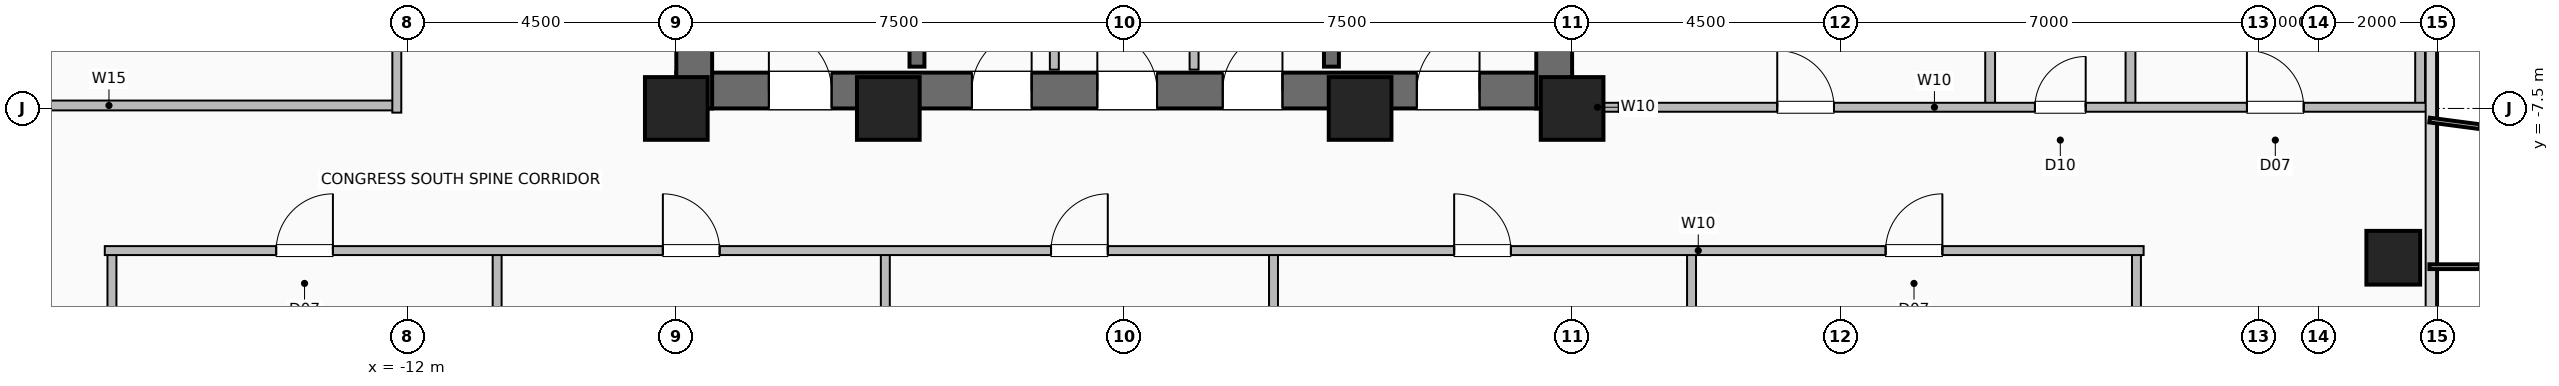
"""IFC4 building model, lengths in metres.
Left out: names, types, materials, properties, quantities, classifications, styles, units other than length and angle.
Written with IfcOpenShell. Run it as: python <this file> out.ifc"""

import sys

from ifc_helpers import new_model, si_unit, direction, frame, frame_2d, origin, origin_2d, place, context, subcontext, project, spatial, rectangle, hollow_rectangle, extrude, element, fill, save


model = new_model("IFC4")
c1 = context("Model", 3, precision=1e-05, world=origin(), true_north=direction((0.0, 1.0)))
c2 = subcontext(c1, "Body", "Model", "MODEL_VIEW")
j1 = project(units=[si_unit("LENGTHUNIT", "METRE"), si_unit("PLANEANGLEUNIT", "RADIAN")], contexts=[c1])
p1 = place(None, origin())
s1 = spatial("IfcSite", under=j1, at=p1, CompositionType="ELEMENT")
p2 = place(p1, origin())
s2 = spatial("IfcBuilding", under=s1, at=p2, CompositionType="ELEMENT")
p3 = place(p2, frame((0.0, 0.0, 115.6)))
s3 = spatial("IfcBuildingStorey", under=s2, at=p3, CompositionType="ELEMENT", Elevation=115.6)
for number, where, z_axis, x_axis in (
    (1, (-7.5, -7.5, 0.0), (0.0, 0.0, 1.0), (1.0, 0.0, 0.0)),
    (2, (-3.95, -7.5, 0.0), (0.0, 0.0, 1.0), (1.0, 0.0, 0.0)),
    (3, (3.95, -7.5, 0.0), (0.0, 0.0, 1.0), (1.0, 0.0, 0.0)),
    (4, (7.5, -7.5, 0.0), (0.0, 0.0, 1.0), (1.0, 0.0, 0.0)),
):
    element("IfcColumn", number, at=place(p3, frame(where, z_axis=z_axis, x_axis=x_axis)), inside=s3, PredefinedType="COLUMN", context=c2, shape_type="SweptSolid", body=[
        extrude(hollow_rectangle(XDim=1.05, YDim=1.05, WallThickness=0.05, at=origin_2d()), origin(), (0.0, 0.0, 1.0), 3.6),
    ])
p4 = place(p3, frame((21.25, -10.0, 0.0), z_axis=(0.0, 0.0, 1.0), x_axis=(1.0, 0.0, 0.0)))
e5 = element("IfcColumn", 5, at=p4, inside=s3, PredefinedType="COLUMN", context=c2, shape_type="SweptSolid", body=[
    extrude(hollow_rectangle(XDim=0.9, YDim=0.9, WallThickness=0.045, at=origin_2d()), origin(), (0.0, 0.0, 1.0), 3.6),
])
p5 = place(p3, frame((-7.5, -7.2, 0.0), z_axis=(0.0, 0.0, 1.0), x_axis=(1.0, 0.0, 0.0)))
e6 = element("IfcWall", 6, at=p5, inside=s3, PredefinedType="SHEAR", context=c2, shape_type="SweptSolid", body=[
    extrude(rectangle(XDim=15.0, YDim=0.6, at=frame_2d((7.5, 0.0))), origin(), (0.0, 0.0, 1.0), 3.36),
])
p6 = place(p5, frame((1.55, 0.0, 0.0)))
e7 = element("IfcOpeningElement", 7, at=p6, cuts=e6, PredefinedType="OPENING", context=c2, shape_type="SweptSolid", body=[
    extrude(rectangle(XDim=1.05, YDim=2.08, at=frame_2d((0.525, 1.04))), frame((0.0, 0.31, 0.0), z_axis=(0.0, -1.0, 0.0), x_axis=(1.0, 0.0, 0.0)), (0.0, 0.0, 1.0), 0.62),
])
p7 = place(p5, frame((12.4, 0.0, 0.0)))
e8 = element("IfcOpeningElement", 8, at=p7, cuts=e6, PredefinedType="OPENING", context=c2, shape_type="SweptSolid", body=[
    extrude(rectangle(XDim=1.05, YDim=2.08, at=frame_2d((0.525, 1.04))), frame((0.0, 0.31, 0.0), z_axis=(0.0, -1.0, 0.0), x_axis=(1.0, 0.0, 0.0)), (0.0, 0.0, 1.0), 0.62),
])
p8 = place(p5, frame((4.95, 0.0, 0.0)))
e9 = element("IfcOpeningElement", 9, at=p8, cuts=e6, PredefinedType="OPENING", context=c2, shape_type="SweptSolid", body=[
    extrude(rectangle(XDim=1.0, YDim=2.08, at=frame_2d((0.5, 1.04))), frame((0.0, 0.31, 0.0), z_axis=(0.0, -1.0, 0.0), x_axis=(1.0, 0.0, 0.0)), (0.0, 0.0, 1.0), 0.62),
])
p9 = place(p5, frame((7.05, 0.0, 0.0)))
e10 = element("IfcOpeningElement", 10, at=p9, cuts=e6, PredefinedType="OPENING", context=c2, shape_type="SweptSolid", body=[
    extrude(rectangle(XDim=1.0, YDim=2.08, at=frame_2d((0.5, 1.04))), frame((0.0, 0.31, 0.0), z_axis=(0.0, -1.0, 0.0), x_axis=(1.0, 0.0, 0.0)), (0.0, 0.0, 1.0), 0.62),
])
p10 = place(p5, frame((9.15, 0.0, 0.0)))
e11 = element("IfcOpeningElement", 11, at=p10, cuts=e6, PredefinedType="OPENING", context=c2, shape_type="SweptSolid", body=[
    extrude(rectangle(XDim=1.0, YDim=2.08, at=frame_2d((0.5, 1.04))), frame((0.0, 0.31, 0.0), z_axis=(0.0, -1.0, 0.0), x_axis=(1.0, 0.0, 0.0)), (0.0, 0.0, 1.0), 0.62),
])
p11 = place(p3, frame((-7.2, -7.5, 0.0), z_axis=(0.0, 0.0, 1.0), x_axis=(0.0, 1.0, 0.0)))
e12 = element("IfcWall", 12, at=p11, inside=s3, PredefinedType="SHEAR", context=c2, shape_type="SweptSolid", body=[
    extrude(rectangle(XDim=15.0, YDim=0.6, at=frame_2d((7.5, 0.0))), origin(), (0.0, 0.0, 1.0), 3.36),
])
p12 = place(p11, frame((9.5, 0.0, 0.0)))
e13 = element("IfcOpeningElement", 13, at=p12, cuts=e12, PredefinedType="OPENING", context=c2, shape_type="SweptSolid", body=[
    extrude(rectangle(XDim=1.0, YDim=2.08, at=frame_2d((0.5, 1.04))), frame((0.0, 0.31, 0.0), z_axis=(0.0, -1.0, 0.0), x_axis=(1.0, 0.0, 0.0)), (0.0, 0.0, 1.0), 0.62),
])
p13 = place(p3, frame((7.2, -7.5, 0.0), z_axis=(0.0, 0.0, 1.0), x_axis=(0.0, 1.0, 0.0)))
e14 = element("IfcWall", 14, at=p13, inside=s3, PredefinedType="SHEAR", context=c2, shape_type="SweptSolid", body=[
    extrude(rectangle(XDim=15.0, YDim=0.6, at=frame_2d((7.5, 0.0))), origin(), (0.0, 0.0, 1.0), 3.36),
])
for number, where, z_axis, x_axis in (
    (15, (-3.47, -6.8, 0.0), (0.0, 0.0, 1.0), (0.0, 1.0, 0.0)),
    (16, (3.47, -6.8, 0.0), (0.0, 0.0, 1.0), (0.0, 1.0, 0.0)),
):
    element("IfcWall", number, at=place(p3, frame(where, z_axis=z_axis, x_axis=x_axis)), inside=s3, PredefinedType="SHEAR", context=c2, shape_type="SweptSolid", body=[
        extrude(rectangle(XDim=7.72, YDim=0.25, at=frame_2d((3.86, 0.0))), origin(), (0.0, 0.0, 1.0), 3.36),
    ])
for number, where, z_axis, x_axis in (
    (17, (-1.17, -6.85, 0.0), (0.0, 0.0, 1.0), (0.0, 1.0, 0.0)),
    (18, (1.17, -6.85, 0.0), (0.0, 0.0, 1.0), (0.0, 1.0, 0.0)),
):
    element("IfcWall", number, at=place(p3, frame(where, z_axis=z_axis, x_axis=x_axis)), inside=s3, PredefinedType="PARTITIONING", context=c2, shape_type="SweptSolid", body=[
        extrude(rectangle(XDim=4.42, YDim=0.15, at=frame_2d((2.21, 0.0))), origin(), (0.0, 0.0, 1.0), 3.36),
    ])
for number, where, z_axis, x_axis in (
    (19, (-16.95, -21.82, 0.0), (0.0, 0.0, 1.0), (0.0, 1.0, 0.0)),
    (20, (-10.5, -21.82, 0.0), (0.0, 0.0, 1.0), (0.0, 1.0, 0.0)),
    (21, (-4.0, -21.82, 0.0), (0.0, 0.0, 1.0), (0.0, 1.0, 0.0)),
    (22, (2.5, -21.82, 0.0), (0.0, 0.0, 1.0), (0.0, 1.0, 0.0)),
    (23, (9.5, -21.82, 0.0), (0.0, 0.0, 1.0), (0.0, 1.0, 0.0)),
    (24, (16.95, -21.82, 0.0), (0.0, 0.0, 1.0), (0.0, 1.0, 0.0)),
):
    element("IfcWall", number, at=place(p3, frame(where, z_axis=z_axis, x_axis=x_axis)), inside=s3, PredefinedType="PARTITIONING", context=c2, shape_type="SweptSolid", body=[
        extrude(rectangle(XDim=11.94, YDim=0.15, at=frame_2d((5.97, 0.0))), origin(), (0.0, 0.0, 1.0), 3.36),
    ])
p14 = place(p3, frame((-17.07, -9.88, 0.0), z_axis=(0.0, 0.0, 1.0), x_axis=(1.0, 0.0, 0.0)))
e25 = element("IfcWall", 25, at=p14, inside=s3, PredefinedType="PARTITIONING", context=c2, shape_type="SweptSolid", body=[
    extrude(rectangle(XDim=34.14, YDim=0.15, at=frame_2d((17.07, 0.0))), origin(), (0.0, 0.0, 1.0), 3.36),
])
p15 = place(p14, frame((2.87, 0.0, 0.0)))
e26 = element("IfcOpeningElement", 26, at=p15, cuts=e25, PredefinedType="OPENING", context=c2, shape_type="SweptSolid", body=[
    extrude(rectangle(XDim=0.95, YDim=2.06, at=frame_2d((0.475, 1.03))), frame((0.0, 0.085, 0.0), z_axis=(0.0, -1.0, 0.0), x_axis=(1.0, 0.0, 0.0)), (0.0, 0.0, 1.0), 0.17),
])
p16 = place(p14, frame((9.345, 0.0, 0.0)))
e27 = element("IfcOpeningElement", 27, at=p16, cuts=e25, PredefinedType="OPENING", context=c2, shape_type="SweptSolid", body=[
    extrude(rectangle(XDim=0.95, YDim=2.06, at=frame_2d((0.475, 1.03))), frame((0.0, 0.085, 0.0), z_axis=(0.0, -1.0, 0.0), x_axis=(1.0, 0.0, 0.0)), (0.0, 0.0, 1.0), 0.17),
])
p17 = place(p14, frame((15.845, 0.0, 0.0)))
e28 = element("IfcOpeningElement", 28, at=p17, cuts=e25, PredefinedType="OPENING", context=c2, shape_type="SweptSolid", body=[
    extrude(rectangle(XDim=0.95, YDim=2.06, at=frame_2d((0.475, 1.03))), frame((0.0, 0.085, 0.0), z_axis=(0.0, -1.0, 0.0), x_axis=(1.0, 0.0, 0.0)), (0.0, 0.0, 1.0), 0.17),
])
p18 = place(p14, frame((22.595, 0.0, 0.0)))
e29 = element("IfcOpeningElement", 29, at=p18, cuts=e25, PredefinedType="OPENING", context=c2, shape_type="SweptSolid", body=[
    extrude(rectangle(XDim=0.95, YDim=2.06, at=frame_2d((0.475, 1.03))), frame((0.0, 0.085, 0.0), z_axis=(0.0, -1.0, 0.0), x_axis=(1.0, 0.0, 0.0)), (0.0, 0.0, 1.0), 0.17),
])
p19 = place(p14, frame((29.82, 0.0, 0.0)))
e30 = element("IfcOpeningElement", 30, at=p19, cuts=e25, PredefinedType="OPENING", context=c2, shape_type="SweptSolid", body=[
    extrude(rectangle(XDim=0.95, YDim=2.06, at=frame_2d((0.475, 1.03))), frame((0.0, 0.085, 0.0), z_axis=(0.0, -1.0, 0.0), x_axis=(1.0, 0.0, 0.0)), (0.0, 0.0, 1.0), 0.17),
])
p20 = place(p3, frame((-21.82, -7.45, 0.0), z_axis=(0.0, 0.0, 1.0), x_axis=(1.0, 0.0, 0.0)))
e31 = element("IfcWall", 31, at=p20, inside=s3, PredefinedType="PLUMBINGWALL", context=c2, shape_type="SweptSolid", body=[
    extrude(rectangle(XDim=9.64, YDim=0.165, at=frame_2d((4.82, 0.0))), origin(), (0.0, 0.0, 1.0), 3.36),
])
p21 = place(p3, frame((-12.18, -7.57, 0.0), z_axis=(0.0, 0.0, 1.0), x_axis=(0.0, 1.0, 0.0)))
e32 = element("IfcWall", 32, at=p21, inside=s3, PredefinedType="PARTITIONING", context=c2, shape_type="SweptSolid", body=[
    extrude(rectangle(XDim=15.14, YDim=0.15, at=frame_2d((7.57, 0.0))), origin(), (0.0, 0.0, 1.0), 3.36),
])
p22 = place(p21, frame((7.095, 0.0, 0.0)))
e33 = element("IfcOpeningElement", 33, at=p22, cuts=e32, PredefinedType="OPENING", context=c2, shape_type="SweptSolid", body=[
    extrude(rectangle(XDim=0.95, YDim=2.06, at=frame_2d((0.475, 1.03))), frame((0.0, 0.085, 0.0), z_axis=(0.0, -1.0, 0.0), x_axis=(1.0, 0.0, 0.0)), (0.0, 0.0, 1.0), 0.17),
])
p23 = place(p3, frame((7.45, -7.48, 0.0), z_axis=(0.0, 0.0, 1.0), x_axis=(1.0, 0.0, 0.0)))
e34 = element("IfcWall", 34, at=p23, inside=s3, PredefinedType="PARTITIONING", context=c2, shape_type="SweptSolid", body=[
    extrude(rectangle(XDim=0.95, YDim=0.15, at=frame_2d((0.475, 0.0))), origin(), (0.0, 0.0, 1.0), 3.36),
])
for number, where, z_axis, x_axis in (
    (35, (16.85, -7.48, 0.0), (0.0, 0.0, 1.0), (0.0, 1.0, 0.0)),
    (36, (14.5, -7.48, 0.0), (0.0, 0.0, 1.0), (0.0, 1.0, 0.0)),
    (37, (21.7, -7.48, 0.0), (0.0, 0.0, 1.0), (0.0, 1.0, 0.0)),
):
    element("IfcWall", number, at=place(p3, frame(where, z_axis=z_axis, x_axis=x_axis)), inside=s3, PredefinedType="PLUMBINGWALL", context=c2, shape_type="SweptSolid", body=[
        extrude(rectangle(XDim=14.88, YDim=0.165, at=frame_2d((7.44, 0.0))), origin(), (0.0, 0.0, 1.0), 3.36),
    ])
p24 = place(p3, frame((8.28, -7.48, 0.0), z_axis=(0.0, 0.0, 1.0), x_axis=(1.0, 0.0, 0.0)))
e38 = element("IfcWall", 38, at=p24, inside=s3, PredefinedType="PARTITIONING", context=c2, shape_type="SweptSolid", body=[
    extrude(rectangle(XDim=13.54, YDim=0.15, at=frame_2d((6.77, 0.0))), origin(), (0.0, 0.0, 1.0), 3.36),
])
p25 = place(p24, frame((2.655, 0.0, 0.0)))
e39 = element("IfcOpeningElement", 39, at=p25, cuts=e38, PredefinedType="OPENING", context=c2, shape_type="SweptSolid", body=[
    extrude(rectangle(XDim=0.95, YDim=2.06, at=frame_2d((0.475, 1.03))), frame((0.0, 0.085, 0.0), z_axis=(0.0, -1.0, 0.0), x_axis=(1.0, 0.0, 0.0)), (0.0, 0.0, 1.0), 0.17),
])
p26 = place(p24, frame((6.97, 0.0, 0.0)))
e40 = element("IfcOpeningElement", 40, at=p26, cuts=e38, PredefinedType="OPENING", context=c2, shape_type="SweptSolid", body=[
    extrude(rectangle(XDim=0.85, YDim=2.05, at=frame_2d((0.425, 1.025))), frame((0.0, 0.085, 0.0), z_axis=(0.0, -1.0, 0.0), x_axis=(1.0, 0.0, 0.0)), (0.0, 0.0, 1.0), 0.17),
])
p27 = place(p24, frame((10.52, 0.0, 0.0)))
e41 = element("IfcOpeningElement", 41, at=p27, cuts=e38, PredefinedType="OPENING", context=c2, shape_type="SweptSolid", body=[
    extrude(rectangle(XDim=0.95, YDim=2.06, at=frame_2d((0.475, 1.03))), frame((0.0, 0.085, 0.0), z_axis=(0.0, -1.0, 0.0), x_axis=(1.0, 0.0, 0.0)), (0.0, 0.0, 1.0), 0.17),
])
p28 = place(p6, origin())
e42 = element("IfcDoor", 42, at=p28, inside=s3, OperationType="SINGLE_SWING_LEFT", PredefinedType="DOOR", context=c2, shape_type="SweptSolid", body=[
    extrude(rectangle(XDim=1.05, YDim=2.08, at=frame_2d((0.525, 1.04))), frame((0.0, 0.025, 0.0), z_axis=(0.0, -1.0, 0.0), x_axis=(1.0, 0.0, 0.0)), (0.0, 0.0, 1.0), 0.05),
])
fill(e7, e42)
p29 = place(p7, origin())
e43 = element("IfcDoor", 43, at=p29, inside=s3, OperationType="SINGLE_SWING_RIGHT", PredefinedType="DOOR", context=c2, shape_type="SweptSolid", body=[
    extrude(rectangle(XDim=1.05, YDim=2.08, at=frame_2d((0.525, 1.04))), frame((0.0, 0.025, 0.0), z_axis=(0.0, -1.0, 0.0), x_axis=(1.0, 0.0, 0.0)), (0.0, 0.0, 1.0), 0.05),
])
fill(e8, e43)
p30 = place(p8, origin())
e44 = element("IfcDoor", 44, at=p30, inside=s3, OperationType="SINGLE_SWING_RIGHT", PredefinedType="DOOR", context=c2, shape_type="SweptSolid", body=[
    extrude(rectangle(XDim=1.0, YDim=2.08, at=frame_2d((0.5, 1.04))), frame((0.0, 0.025, 0.0), z_axis=(0.0, -1.0, 0.0), x_axis=(1.0, 0.0, 0.0)), (0.0, 0.0, 1.0), 0.05),
])
fill(e9, e44)
p31 = place(p9, origin())
e45 = element("IfcDoor", 45, at=p31, inside=s3, OperationType="SINGLE_SWING_LEFT", PredefinedType="DOOR", context=c2, shape_type="SweptSolid", body=[
    extrude(rectangle(XDim=1.0, YDim=2.08, at=frame_2d((0.5, 1.04))), frame((0.0, 0.025, 0.0), z_axis=(0.0, -1.0, 0.0), x_axis=(1.0, 0.0, 0.0)), (0.0, 0.0, 1.0), 0.05),
])
fill(e10, e45)
p32 = place(p10, origin())
e46 = element("IfcDoor", 46, at=p32, inside=s3, OperationType="SINGLE_SWING_RIGHT", PredefinedType="DOOR", context=c2, shape_type="SweptSolid", body=[
    extrude(rectangle(XDim=1.0, YDim=2.08, at=frame_2d((0.5, 1.04))), frame((0.0, 0.025, 0.0), z_axis=(0.0, -1.0, 0.0), x_axis=(1.0, 0.0, 0.0)), (0.0, 0.0, 1.0), 0.05),
])
fill(e11, e46)
p33 = place(p15, origin())
e47 = element("IfcDoor", 47, at=p33, inside=s3, OperationType="SINGLE_SWING_RIGHT", PredefinedType="DOOR", context=c2, shape_type="SweptSolid", body=[
    extrude(rectangle(XDim=0.95, YDim=2.06, at=frame_2d((0.475, 1.03))), frame((0.0, 0.025, 0.0), z_axis=(0.0, -1.0, 0.0), x_axis=(1.0, 0.0, 0.0)), (0.0, 0.0, 1.0), 0.05),
])
fill(e26, e47)
p34 = place(p16, origin())
e48 = element("IfcDoor", 48, at=p34, inside=s3, OperationType="SINGLE_SWING_LEFT", PredefinedType="DOOR", context=c2, shape_type="SweptSolid", body=[
    extrude(rectangle(XDim=0.95, YDim=2.06, at=frame_2d((0.475, 1.03))), frame((0.0, 0.025, 0.0), z_axis=(0.0, -1.0, 0.0), x_axis=(1.0, 0.0, 0.0)), (0.0, 0.0, 1.0), 0.05),
])
fill(e27, e48)
p35 = place(p17, origin())
e49 = element("IfcDoor", 49, at=p35, inside=s3, OperationType="SINGLE_SWING_RIGHT", PredefinedType="DOOR", context=c2, shape_type="SweptSolid", body=[
    extrude(rectangle(XDim=0.95, YDim=2.06, at=frame_2d((0.475, 1.03))), frame((0.0, 0.025, 0.0), z_axis=(0.0, -1.0, 0.0), x_axis=(1.0, 0.0, 0.0)), (0.0, 0.0, 1.0), 0.05),
])
fill(e28, e49)
p36 = place(p18, origin())
e50 = element("IfcDoor", 50, at=p36, inside=s3, OperationType="SINGLE_SWING_LEFT", PredefinedType="DOOR", context=c2, shape_type="SweptSolid", body=[
    extrude(rectangle(XDim=0.95, YDim=2.06, at=frame_2d((0.475, 1.03))), frame((0.0, 0.025, 0.0), z_axis=(0.0, -1.0, 0.0), x_axis=(1.0, 0.0, 0.0)), (0.0, 0.0, 1.0), 0.05),
])
fill(e29, e50)
p37 = place(p19, origin())
e51 = element("IfcDoor", 51, at=p37, inside=s3, OperationType="SINGLE_SWING_RIGHT", PredefinedType="DOOR", context=c2, shape_type="SweptSolid", body=[
    extrude(rectangle(XDim=0.95, YDim=2.06, at=frame_2d((0.475, 1.03))), frame((0.0, 0.025, 0.0), z_axis=(0.0, -1.0, 0.0), x_axis=(1.0, 0.0, 0.0)), (0.0, 0.0, 1.0), 0.05),
])
fill(e30, e51)
p38 = place(p25, origin())
e52 = element("IfcDoor", 52, at=p38, inside=s3, OperationType="SINGLE_SWING_LEFT", PredefinedType="DOOR", context=c2, shape_type="SweptSolid", body=[
    extrude(rectangle(XDim=0.95, YDim=2.06, at=frame_2d((0.475, 1.03))), frame((0.0, 0.025, 0.0), z_axis=(0.0, -1.0, 0.0), x_axis=(1.0, 0.0, 0.0)), (0.0, 0.0, 1.0), 0.05),
])
fill(e39, e52)
p39 = place(p26, origin())
e53 = element("IfcDoor", 53, at=p39, inside=s3, OperationType="SINGLE_SWING_RIGHT", PredefinedType="DOOR", context=c2, shape_type="SweptSolid", body=[
    extrude(rectangle(XDim=0.85, YDim=2.05, at=frame_2d((0.425, 1.025))), frame((0.0, 0.025, 0.0), z_axis=(0.0, -1.0, 0.0), x_axis=(1.0, 0.0, 0.0)), (0.0, 0.0, 1.0), 0.05),
])
fill(e40, e53)
p40 = place(p27, origin())
e54 = element("IfcDoor", 54, at=p40, inside=s3, OperationType="SINGLE_SWING_LEFT", PredefinedType="DOOR", context=c2, shape_type="SweptSolid", body=[
    extrude(rectangle(XDim=0.95, YDim=2.06, at=frame_2d((0.475, 1.03))), frame((0.0, 0.025, 0.0), z_axis=(0.0, -1.0, 0.0), x_axis=(1.0, 0.0, 0.0)), (0.0, 0.0, 1.0), 0.05),
])
fill(e41, e54)
save(model, sys.argv[1])
